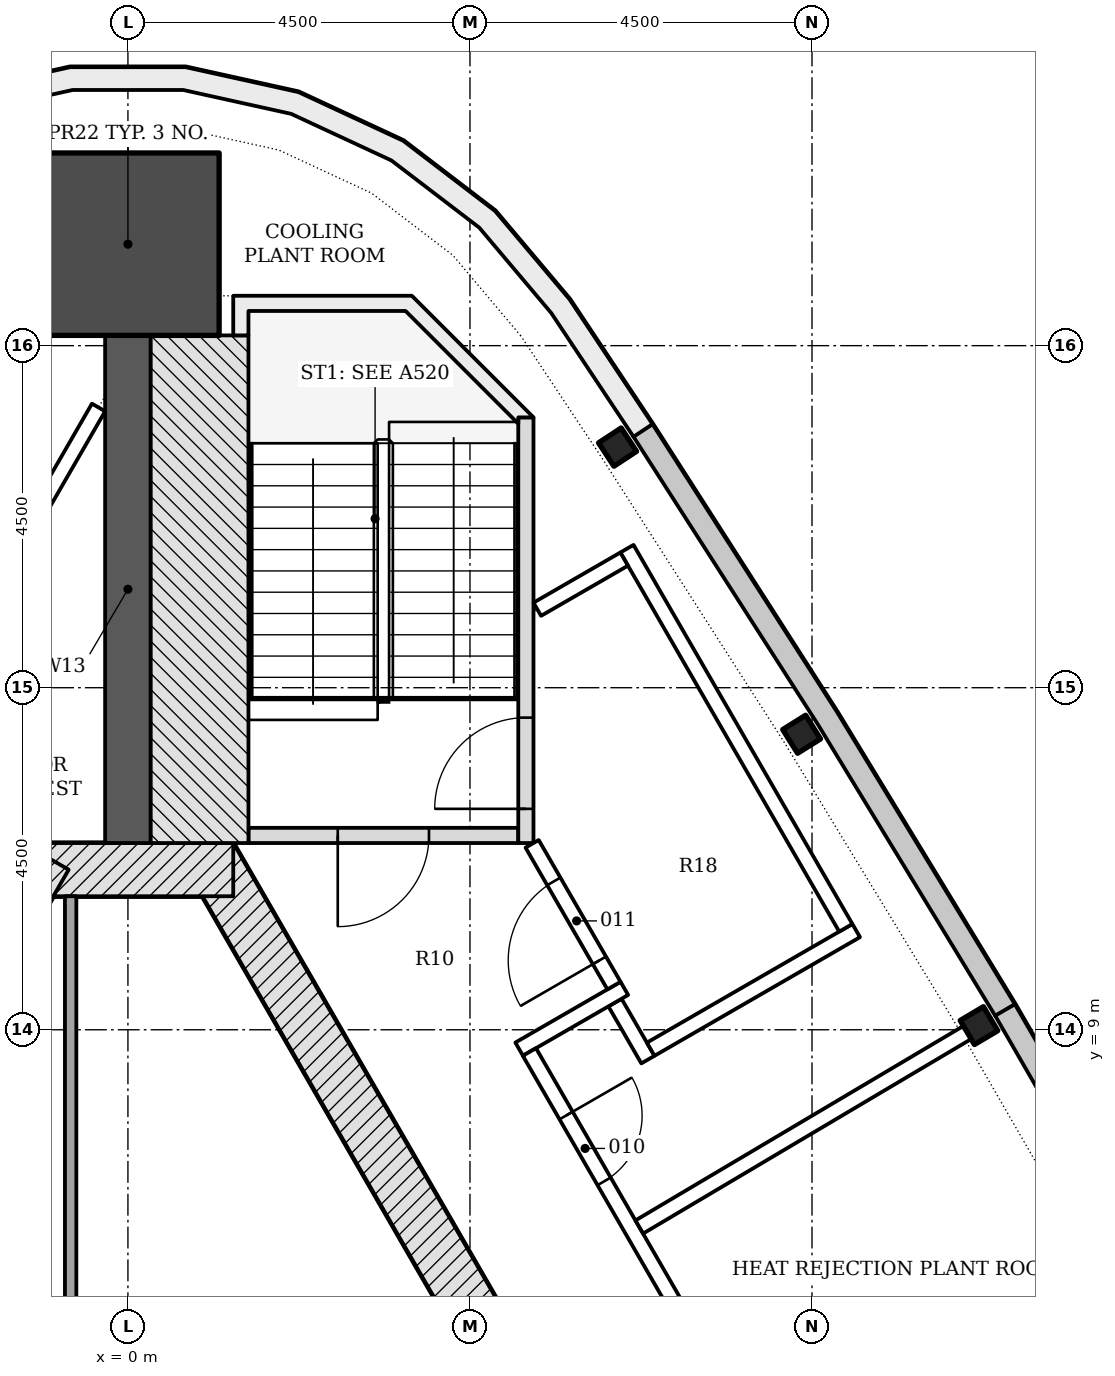
"""IFC4 building model, lengths in metres.
Left out: names, types, materials, properties, quantities, classifications, styles, units other than length and angle.
Written with IfcOpenShell. Run it as: python <this file> out.ifc"""

import sys

from ifc_helpers import new_model, si_unit, direction, frame, frame_2d, origin, origin_2d, place, context, subcontext, project, spatial, polyline, rectangle, i_section, outline, extrude, element, fill, save


model = new_model("IFC4")
c1 = context("Model", 3, precision=1e-05, world=origin(), true_north=direction((0.0, 1.0)))
c2 = subcontext(c1, "Body", "Model", "MODEL_VIEW")
j1 = project(units=[si_unit("LENGTHUNIT", "METRE"), si_unit("PLANEANGLEUNIT", "RADIAN")], contexts=[c1])
p1 = place(None, origin())
s1 = spatial("IfcSite", under=j1, at=p1, CompositionType="ELEMENT")
p2 = place(p1, origin())
s2 = spatial("IfcBuilding", under=s1, at=p2, CompositionType="ELEMENT")
p3 = place(p2, frame((0.0, 0.0, 288.6)))
s3 = spatial("IfcBuildingStorey", under=s2, at=p3, CompositionType="ELEMENT", Elevation=288.6)
p4 = place(p3, frame((10.311, -4.703, -0.25), z_axis=(0.0, 0.0, 1.0), x_axis=(-0.500001446645, 0.866024568562, 0.0)))
e1 = element("IfcWall", 1, at=p4, inside=s3, PredefinedType="SHEAR", context=c2, shape_type="SweptSolid", body=[
    extrude(rectangle(XDim=18.458, YDim=0.7, at=frame_2d((9.229, 0.0))), origin(), (0.0, 0.0, 1.0), 4.5),
])
p5 = place(p3, frame((1.386, 11.106, -0.25), z_axis=(0.0, 0.0, 1.0), x_axis=(-1.0, 0.0, 0.0)))
e2 = element("IfcWall", 2, at=p5, inside=s3, PredefinedType="SHEAR", context=c2, shape_type="SweptSolid", body=[
    extrude(rectangle(XDim=2.771, YDim=0.7, at=frame_2d((1.386, 0.0))), origin(), (0.0, 0.0, 1.0), 4.5),
])
p6 = place(p3, frame((-1.083, 11.281, -0.25), z_axis=(0.0, 0.0, 1.0), x_axis=(-0.500001446645, -0.866024568562, 0.0)))
e3 = element("IfcWall", 3, at=p6, inside=s3, PredefinedType="SHEAR", context=c2, shape_type="SweptSolid", body=[
    extrude(rectangle(XDim=18.458, YDim=0.7, at=frame_2d((9.229, 0.0))), origin(), (0.0, 0.0, 1.0), 4.5),
])
p7 = place(p6, frame((8.979, 0.0, 0.25)))
e4 = element("IfcOpeningElement", 4, at=p7, cuts=e3, PredefinedType="OPENING", context=c2, shape_type="SweptSolid", body=[
    extrude(rectangle(XDim=1.2, YDim=2.1, at=frame_2d((0.6, 1.05))), frame((0.0, 0.36, 0.0), z_axis=(0.0, -1.0, 0.0), x_axis=(1.0, 0.0, 0.0)), (0.0, 0.0, 1.0), 0.72),
])
p8 = place(p6, frame((11.029, 0.0, 0.25)))
e5 = element("IfcOpeningElement", 5, at=p8, cuts=e3, PredefinedType="OPENING", context=c2, shape_type="SweptSolid", body=[
    extrude(rectangle(XDim=1.2, YDim=2.1, at=frame_2d((0.6, 1.05))), frame((0.0, 0.36, 0.0), z_axis=(0.0, -1.0, 0.0), x_axis=(1.0, 0.0, 0.0)), (0.0, 0.0, 1.0), 0.72),
])
p9 = place(p3, frame((0.0, 11.456, -0.25), z_axis=(0.0, 0.0, 1.0), x_axis=(0.0, 1.0, 0.0)))
e6 = element("IfcWall", 6, at=p9, inside=s3, PredefinedType="SHEAR", context=c2, shape_type="SweptSolid", body=[
    extrude(rectangle(XDim=6.679, YDim=0.6, at=frame_2d((3.339, 0.0))), origin(), (0.0, 0.0, 1.0), 4.5),
])
p10 = place(p3, frame((0.0, 19.335, -0.25), z_axis=(0.0, 0.0, 1.0), x_axis=(0.0, 1.0, 0.0)))
e7 = element("IfcColumn", 7, at=p10, inside=s3, PredefinedType="COLUMN", context=c2, shape_type="SweptSolid", body=[
    extrude(rectangle(XDim=2.4, YDim=2.4, at=origin_2d()), origin(), (0.0, 0.0, 1.0), 4.5),
])
for number, where, z_axis, x_axis in (
    (8, (11.196, 9.055, -0.25), (0.0, 0.0, 1.0), (-0.51, 0.86, 0.0)),
    (9, (8.863, 12.888, -0.25), (0.0, 0.0, 1.0), (-0.53, 0.848, 0.0)),
    (10, (6.442, 16.666, -0.25), (0.0, 0.0, 1.0), (-0.549, 0.836, 0.0)),
):
    element("IfcColumn", number, at=place(p3, frame(where, z_axis=z_axis, x_axis=x_axis)), inside=s3, PredefinedType="COLUMN", context=c2, shape_type="SweptSolid", body=[
        extrude(i_section(OverallWidth=0.368, OverallDepth=0.356, WebThickness=0.011, FlangeThickness=0.018, FilletRadius=0.015, at=origin_2d()), origin(), (0.0, 0.0, 1.0), 4.5),
    ])
p11 = place(p3, origin())
e11 = element("IfcWall", 11, at=p11, inside=s3, PredefinedType="NOTDEFINED", context=c2, shape_type="SweptSolid", body=[
    extrude(outline(polyline([(11.669, 9.335), (9.33, 13.179), (6.901, 16.968), (6.649, 16.806), (9.075, 13.02), (11.413, 9.179), (11.669, 9.335)])), origin(), (0.0, 0.0, 1.0), 4.25),
])
p12 = place(p3, origin())
e12 = element("IfcWall", 12, at=p12, inside=s3, PredefinedType="NOTDEFINED", context=c2, shape_type="SweptSolid", body=[
    extrude(outline(polyline([(13.919, 5.438), (11.669, 9.335), (11.409, 9.185), (13.659, 5.288), (13.919, 5.438)])), origin(), (0.0, 0.0, 1.0), 1.2),
])
p13 = place(p3, origin())
e13 = element("IfcWall", 13, at=p13, inside=s3, PredefinedType="NOTDEFINED", context=c2, shape_type="SweptSolid", body=[
    extrude(outline(polyline([(6.901, 16.968), (5.81, 18.61), (4.83, 19.771), (3.623, 20.695), (2.244, 21.335), (0.76, 21.664), (-0.76, 21.664), (-2.244, 21.335), (-3.623, 20.695), (-4.83, 19.771), (-5.81, 18.61), (-6.901, 16.968), (-6.651, 16.802), (-5.569, 18.429), (-4.622, 19.553), (-3.466, 20.437), (-2.147, 21.05), (-0.727, 21.364), (0.727, 21.364), (2.147, 21.05), (3.466, 20.437), (4.622, 19.553), (5.569, 18.429), (6.651, 16.802), (6.901, 16.968)])), origin(), (0.0, 0.0, 1.0), 4.25),
])
p14 = place(p3, frame((-0.754, 10.756, 0.0), z_axis=(0.0, 0.0, 1.0), x_axis=(0.0, -1.0, 0.0)))
e14 = element("IfcWall", 14, at=p14, inside=s3, PredefinedType="PARTITIONING", context=c2, shape_type="SweptSolid", body=[
    extrude(rectangle(XDim=16.985, YDim=0.15, at=frame_2d((8.492, 0.0))), origin(), (0.0, 0.0, 1.0), 4.25),
])
p15 = place(p14, frame((9.185, 0.0, 0.0)))
e15 = element("IfcOpeningElement", 15, at=p15, cuts=e14, PredefinedType="OPENING", context=c2, shape_type="SweptSolid", body=[
    extrude(rectangle(XDim=0.9, YDim=2.1, at=frame_2d((0.45, 1.05))), frame((0.0, 0.085, 0.0), z_axis=(0.0, -1.0, 0.0), x_axis=(1.0, 0.0, 0.0)), (0.0, 0.0, 1.0), 0.17),
])
p16 = place(p3, frame((5.135, 11.556, -0.25), z_axis=(0.0, 0.0, 1.0), x_axis=(-1.0, 0.0, 0.0)))
e16 = element("IfcWall", 16, at=p16, inside=s3, PredefinedType="SHEAR", context=c2, shape_type="SweptSolid", body=[
    extrude(rectangle(XDim=3.55, YDim=0.2, at=frame_2d((1.775, 0.0))), origin(), (0.0, 0.0, 1.0), 4.5),
])
p17 = place(p16, frame((1.175, 0.0, 0.25)))
e17 = element("IfcOpeningElement", 17, at=p17, cuts=e16, PredefinedType="OPENING", context=c2, shape_type="SweptSolid", body=[
    extrude(rectangle(XDim=1.2, YDim=2.1, at=frame_2d((0.6, 1.05))), frame((0.0, 0.11, 0.0), z_axis=(0.0, -1.0, 0.0), x_axis=(1.0, 0.0, 0.0)), (0.0, 0.0, 1.0), 0.22),
])
p18 = place(p3, frame((5.236, 11.456, -0.25), z_axis=(0.0, 0.0, 1.0), x_axis=(0.0, 1.0, 0.0)))
e18 = element("IfcWall", 18, at=p18, inside=s3, PredefinedType="SHEAR", context=c2, shape_type="SweptSolid", body=[
    extrude(rectangle(XDim=5.6, YDim=0.2, at=frame_2d((2.8, 0.0))), origin(), (0.0, 0.0, 1.0), 4.5),
])
p19 = place(p18, frame((0.45, 0.0, 0.25)))
e19 = element("IfcOpeningElement", 19, at=p19, cuts=e18, PredefinedType="OPENING", context=c2, shape_type="SweptSolid", body=[
    extrude(rectangle(XDim=1.2, YDim=2.1, at=frame_2d((0.6, 1.05))), frame((0.0, 0.11, 0.0), z_axis=(0.0, -1.0, 0.0), x_axis=(1.0, 0.0, 0.0)), (0.0, 0.0, 1.0), 0.22),
])
p20 = place(p3, frame((0.943, 11.456, -0.25), z_axis=(0.0, 0.0, 1.0), x_axis=(0.0, 1.0, 0.0)))
e20 = element("IfcWall", 20, at=p20, inside=s3, PredefinedType="SHEAR", context=c2, shape_type="SweptSolid", body=[
    extrude(rectangle(XDim=6.679, YDim=1.286, at=frame_2d((3.339, 0.0))), origin(), (0.0, 0.0, 1.0), 4.5),
])
p21 = place(p3, frame((0.0, 0.0, -0.25)))
e21 = element("IfcWall", 21, at=p21, inside=s3, PredefinedType="SHEAR", context=c2, shape_type="SweptSolid", body=[
    extrude(outline(polyline([(5.336, 17.056), (3.736, 18.656), (1.385, 18.656), (1.385, 18.135), (1.586, 18.135), (1.586, 18.456), (3.653, 18.456), (5.135, 16.974), (5.135, 17.056), (5.135, 17.056), (5.135, 17.056), (5.135, 17.056), (5.135, 17.056), (5.135, 17.056), (5.135, 17.056), (5.135, 17.056), (5.135, 17.056), (5.135, 17.056), (5.135, 17.056), (5.135, 17.056), (5.135, 17.056), (5.135, 17.056), (5.135, 17.056), (5.135, 17.056), (5.135, 17.056), (5.336, 17.056)])), origin(), (0.0, 0.0, 1.0), 4.5),
])
p22 = place(p3, frame((-7.307, 5.2, 0.0), z_axis=(0.0, 0.0, 1.0), x_axis=(0.49999780173, 0.866026672953, 0.0)))
e22 = element("IfcWall", 22, at=p22, inside=s3, PredefinedType="PARTITIONING", context=c2, shape_type="SweptSolid", body=[
    extrude(rectangle(XDim=13.841, YDim=0.2, at=frame_2d((6.92, 0.0))), origin(), (0.0, 0.0, 1.0), 3.702),
])
p23 = place(p22, frame((6.454, 0.0, 0.0)))
e23 = element("IfcOpeningElement", 23, at=p23, cuts=e22, PredefinedType="OPENING", context=c2, shape_type="SweptSolid", body=[
    extrude(rectangle(XDim=1.0, YDim=2.1, at=frame_2d((0.5, 1.05))), frame((0.0, 0.11, 0.0), z_axis=(0.0, -1.0, 0.0), x_axis=(1.0, 0.0, 0.0)), (0.0, 0.0, 1.0), 0.22),
])
p24 = place(p3, frame((6.408, 9.358, 0.0), z_axis=(0.0, 0.0, 1.0), x_axis=(0.499958279983, -0.866049489508, 0.0)))
e24 = element("IfcWall", 24, at=p24, inside=s3, PredefinedType="PARTITIONING", context=c2, shape_type="SweptSolid", body=[
    extrude(rectangle(XDim=0.866, YDim=0.2, at=frame_2d((0.433, 0.0))), origin(), (0.0, 0.0, 1.0), 4.25),
])
p25 = place(p3, frame((5.147, 8.745, 0.0), z_axis=(0.0, 0.0, 1.0), x_axis=(0.865987117328, 0.500066308224, 0.0)))
e25 = element("IfcWall", 25, at=p25, inside=s3, PredefinedType="PARTITIONING", context=c2, shape_type="SweptSolid", body=[
    extrude(rectangle(XDim=1.598, YDim=0.2, at=frame_2d((0.799, 0.0))), origin(), (0.0, 0.0, 1.0), 4.25),
])
p26 = place(p3, frame((6.395, 9.581, 0.0), z_axis=(0.0, 0.0, 1.0), x_axis=(-0.500003735859, 0.866023246874, 0.0)))
e26 = element("IfcWall", 26, at=p26, inside=s3, PredefinedType="PARTITIONING", context=c2, shape_type="SweptSolid", body=[
    extrude(rectangle(XDim=2.154, YDim=0.2, at=frame_2d((1.077, 0.0))), origin(), (0.0, 0.0, 1.0), 3.702),
])
p27 = place(p26, frame((0.383, 0.0, 0.0)))
e27 = element("IfcOpeningElement", 27, at=p27, cuts=e26, PredefinedType="OPENING", context=c2, shape_type="SweptSolid", body=[
    extrude(rectangle(XDim=1.2, YDim=2.1, at=frame_2d((0.6, 1.05))), frame((0.0, 0.11, 0.0), z_axis=(0.0, -1.0, 0.0), x_axis=(1.0, 0.0, 0.0)), (0.0, 0.0, 1.0), 0.22),
])
p28 = place(p3, frame((5.282, 8.708, 0.0), z_axis=(0.0, 0.0, 1.0), x_axis=(0.500001848211, -0.866024336717, 0.0)))
e28 = element("IfcWall", 28, at=p28, inside=s3, PredefinedType="PARTITIONING", context=c2, shape_type="SweptSolid", body=[
    extrude(rectangle(XDim=19.591, YDim=0.2, at=frame_2d((9.795, 0.0))), origin(), (0.0, 0.0, 1.0), 3.702),
])
p29 = place(p28, frame((12.923, 0.0, 0.0)))
e29 = element("IfcOpeningElement", 29, at=p29, cuts=e28, PredefinedType="OPENING", context=c2, shape_type="SweptSolid", body=[
    extrude(rectangle(XDim=1.0, YDim=2.1, at=frame_2d((0.5, 1.05))), frame((0.0, 0.11, 0.0), z_axis=(0.0, -1.0, 0.0), x_axis=(1.0, 0.0, 0.0)), (0.0, 0.0, 1.0), 0.22),
])
p30 = place(p28, frame((4.502, 0.0, 0.0)))
e30 = element("IfcOpeningElement", 30, at=p30, cuts=e28, PredefinedType="OPENING", context=c2, shape_type="SweptSolid", body=[
    extrude(rectangle(XDim=1.0, YDim=2.1, at=frame_2d((0.5, 1.05))), frame((0.0, 0.11, 0.0), z_axis=(0.0, -1.0, 0.0), x_axis=(1.0, 0.0, 0.0)), (0.0, 0.0, 1.0), 0.22),
])
p31 = place(p28, frame((0.965, 0.0, 0.0)))
e31 = element("IfcOpeningElement", 31, at=p31, cuts=e28, PredefinedType="OPENING", context=c2, shape_type="SweptSolid", body=[
    extrude(rectangle(XDim=1.0, YDim=2.1, at=frame_2d((0.5, 1.05))), frame((0.0, 0.11, 0.0), z_axis=(0.0, -1.0, 0.0), x_axis=(1.0, 0.0, 0.0)), (0.0, 0.0, 1.0), 0.22),
])
p32 = place(p3, frame((6.728, 6.406, 0.0), z_axis=(0.0, 0.0, 1.0), x_axis=(0.860167296251, 0.510011982664, 0.0)))
e32 = element("IfcWall", 32, at=p32, inside=s3, PredefinedType="PARTITIONING", context=c2, shape_type="SweptSolid", body=[
    extrude(rectangle(XDim=5.044, YDim=0.2, at=frame_2d((2.522, 0.0))), origin(), (0.0, 0.0, 1.0), 3.702),
])
p33 = place(p3, frame((6.878, 8.744, 0.0), z_axis=(0.0, 0.0, 1.0), x_axis=(0.866025387892, 0.500000027526, 0.0)))
e33 = element("IfcWall", 33, at=p33, inside=s3, PredefinedType="PARTITIONING", context=c2, shape_type="SweptSolid", body=[
    extrude(rectangle(XDim=3.122, YDim=0.2, at=frame_2d((1.561, 0.0))), origin(), (0.0, 0.0, 1.0), 4.25),
])
p34 = place(p3, frame((9.445, 10.341, 0.0), z_axis=(0.0, 0.0, 1.0), x_axis=(-0.499996461177, 0.866027446915, 0.0)))
e34 = element("IfcWall", 34, at=p34, inside=s3, PredefinedType="PARTITIONING", context=c2, shape_type="SweptSolid", body=[
    extrude(rectangle(XDim=5.759, YDim=0.2, at=frame_2d((2.879, 0.0))), origin(), (0.0, 0.0, 1.0), 3.702),
])
p35 = place(p3, frame((6.529, 15.192, 0.0), z_axis=(0.0, 0.0, 1.0), x_axis=(-0.866117824122, -0.499839889103, 0.0)))
e35 = element("IfcWall", 35, at=p35, inside=s3, PredefinedType="PARTITIONING", context=c2, shape_type="SweptSolid", body=[
    extrude(rectangle(XDim=1.32, YDim=0.2, at=frame_2d((0.66, 0.0))), origin(), (0.0, 0.0, 1.0), 4.25),
])
p36 = place(p17, origin())
e36 = element("IfcDoor", 36, at=p36, inside=s3, OperationType="SINGLE_SWING_RIGHT", PredefinedType="DOOR", context=c2, shape_type="SweptSolid", body=[
    extrude(rectangle(XDim=1.2, YDim=2.1, at=frame_2d((0.6, 1.05))), frame((0.0, 0.025, 0.0), z_axis=(0.0, -1.0, 0.0), x_axis=(1.0, 0.0, 0.0)), (0.0, 0.0, 1.0), 0.05),
])
fill(e17, e36)
p37 = place(p19, origin())
e37 = element("IfcDoor", 37, at=p37, inside=s3, OperationType="SINGLE_SWING_LEFT", PredefinedType="DOOR", context=c2, shape_type="SweptSolid", body=[
    extrude(rectangle(XDim=1.2, YDim=2.1, at=frame_2d((0.6, 1.05))), frame((0.0, 0.025, 0.0), z_axis=(0.0, -1.0, 0.0), x_axis=(1.0, 0.0, 0.0)), (0.0, 0.0, 1.0), 0.05),
])
fill(e19, e37)
p38 = place(p31, origin())
e38 = element("IfcDoor", 38, at=p38, inside=s3, OperationType="SINGLE_SWING_LEFT", PredefinedType="DOOR", context=c2, shape_type="SweptSolid", body=[
    extrude(rectangle(XDim=1.0, YDim=2.1, at=frame_2d((0.5, 1.05))), frame((0.0, 0.025, 0.0), z_axis=(0.0, -1.0, 0.0), x_axis=(1.0, 0.0, 0.0)), (0.0, 0.0, 1.0), 0.05),
])
fill(e31, e38)
p39 = place(p27, origin())
e39 = element("IfcDoor", 39, at=p39, inside=s3, OperationType="SINGLE_SWING_LEFT", PredefinedType="DOOR", context=c2, shape_type="SweptSolid", body=[
    extrude(rectangle(XDim=1.2, YDim=2.1, at=frame_2d((0.6, 1.05))), frame((0.0, 0.025, 0.0), z_axis=(0.0, -1.0, 0.0), x_axis=(1.0, 0.0, 0.0)), (0.0, 0.0, 1.0), 0.05),
])
fill(e27, e39)
save(model, sys.argv[1])
